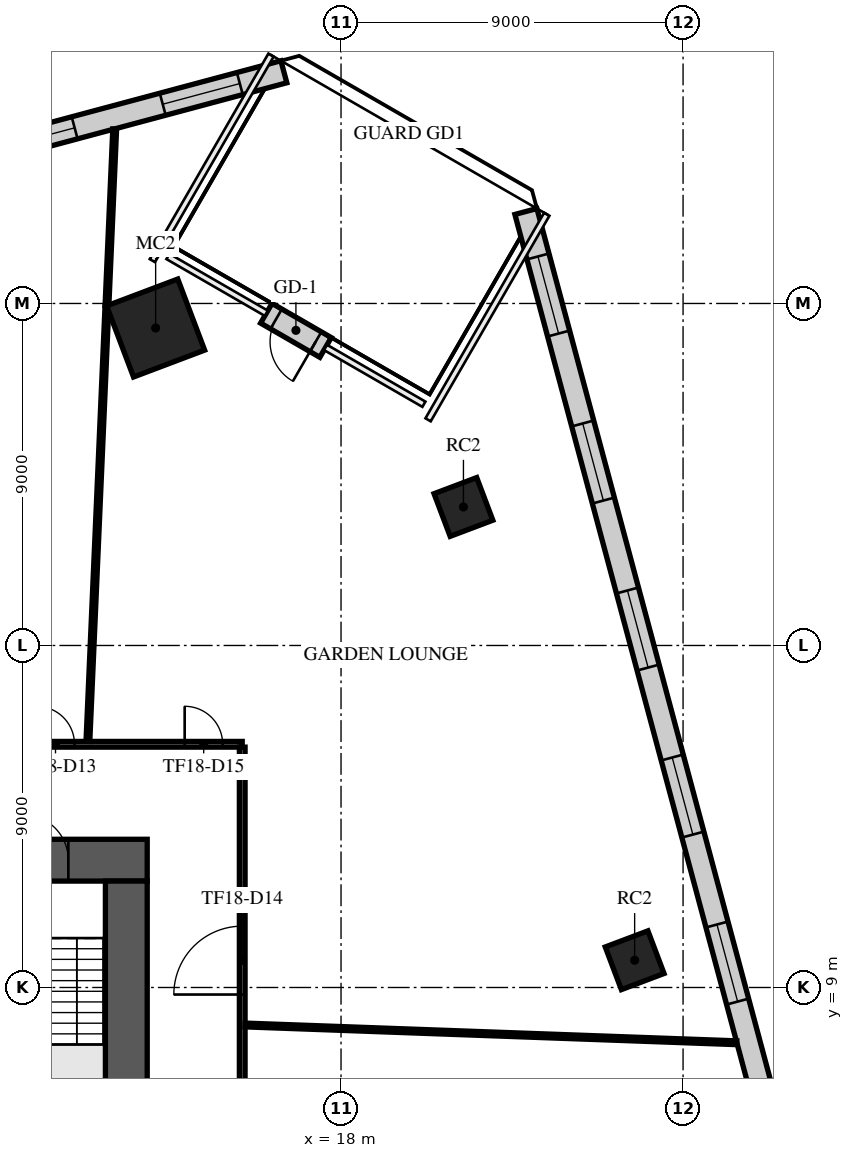
"""IFC4 building model, lengths in metres.
Left out: names, types, materials, properties, quantities, classifications, styles, units other than length and angle.
Written with IfcOpenShell. Run it as: python <this file> out.ifc"""

import sys

from ifc_helpers import new_model, si_unit, direction, frame, frame_2d, origin, origin_2d, place, context, subcontext, project, spatial, rectangle, extrude, element, fill, save


model = new_model("IFC4")
c1 = context("Model", 3, precision=1e-05, world=origin(), true_north=direction((0.0, 1.0)))
c2 = subcontext(c1, "Body", "Model", "MODEL_VIEW")
j1 = project(units=[si_unit("LENGTHUNIT", "METRE"), si_unit("PLANEANGLEUNIT", "RADIAN")], contexts=[c1])
p1 = place(None, origin())
s1 = spatial("IfcSite", under=j1, at=p1, CompositionType="ELEMENT")
p2 = place(p1, origin())
s2 = spatial("IfcBuilding", under=s1, at=p2, CompositionType="ELEMENT")
p3 = place(p2, frame((0.0, 0.0, 82.1)))
s3 = spatial("IfcBuildingStorey", under=s2, at=p3, CompositionType="ELEMENT", Elevation=82.1)
p4 = place(p3, frame((13.122, 26.354, -0.42), z_axis=(0.0, 0.0, 1.0), x_axis=(0.935491525991, 0.353349125935, 0.0)))
e1 = element("IfcColumn", 1, at=p4, inside=s3, PredefinedType="COLUMN", context=c2, shape_type="SweptSolid", body=[
    extrude(rectangle(XDim=2.0, YDim=2.0, at=origin_2d()), origin(), (0.0, 0.0, 1.0), 4.42),
])
for number, where, z_axis, x_axis in (
    (2, (25.726, 9.717, -0.42), (0.0, 0.0, 1.0), (0.935, 0.353, 0.0)),
    (3, (21.221, 21.645, -0.42), (0.0, 0.0, 1.0), (0.935, 0.353, 0.0)),
):
    element("IfcColumn", number, at=place(p3, frame(where, z_axis=z_axis, x_axis=x_axis)), inside=s3, PredefinedType="COLUMN", context=c2, shape_type="SweptSolid", body=[
        extrude(rectangle(XDim=1.2, YDim=1.2, at=origin_2d()), origin(), (0.0, 0.0, 1.0), 4.42),
    ])
p5 = place(p3, frame((-12.9, 12.35, 0.0), z_axis=(0.0, 0.0, 1.0), x_axis=(1.0, 0.0, 0.0)))
e4 = element("IfcWall", 4, at=p5, inside=s3, PredefinedType="SHEAR", context=c2, shape_type="SweptSolid", body=[
    extrude(rectangle(XDim=25.8, YDim=1.1, at=frame_2d((12.9, 0.0))), origin(), (0.0, 0.0, 1.0), 3.58),
])
p6 = place(p5, frame((11.7, 0.0, 0.0)))
e5 = element("IfcOpeningElement", 5, at=p6, cuts=e4, PredefinedType="OPENING", context=c2, shape_type="SweptSolid", body=[
    extrude(rectangle(XDim=2.4, YDim=2.4, at=frame_2d((1.2, 1.2))), frame((0.0, 0.56, 0.0), z_axis=(0.0, -1.0, 0.0), x_axis=(1.0, 0.0, 0.0)), (0.0, 0.0, 1.0), 1.12),
])
p7 = place(p5, frame((22.525, 0.0, 0.0)))
e6 = element("IfcOpeningElement", 6, at=p7, cuts=e4, PredefinedType="OPENING", context=c2, shape_type="SweptSolid", body=[
    extrude(rectangle(XDim=1.2, YDim=2.1, at=frame_2d((0.6, 1.05))), frame((0.0, 0.56, 0.0), z_axis=(0.0, -1.0, 0.0), x_axis=(1.0, 0.0, 0.0)), (0.0, 0.0, 1.0), 1.12),
])
p8 = place(p5, frame((1.5, 0.0, 0.0)))
e7 = element("IfcOpeningElement", 7, at=p8, cuts=e4, PredefinedType="OPENING", context=c2, shape_type="SweptSolid", body=[
    extrude(rectangle(XDim=1.0, YDim=2.1, at=frame_2d((0.5, 1.05))), frame((0.0, 0.56, 0.0), z_axis=(0.0, -1.0, 0.0), x_axis=(1.0, 0.0, 0.0)), (0.0, 0.0, 1.0), 1.12),
])
p9 = place(p3, frame((12.35, -11.8, 0.0), z_axis=(0.0, 0.0, 1.0), x_axis=(0.0, 1.0, 0.0)))
e8 = element("IfcWall", 8, at=p9, inside=s3, PredefinedType="SHEAR", context=c2, shape_type="SweptSolid", body=[
    extrude(rectangle(XDim=23.6, YDim=1.1, at=frame_2d((11.8, 0.0))), origin(), (0.0, 0.0, 1.0), 3.58),
])
p10 = place(p9, frame((10.6, 0.0, 0.0)))
e9 = element("IfcOpeningElement", 9, at=p10, cuts=e8, PredefinedType="OPENING", context=c2, shape_type="SweptSolid", body=[
    extrude(rectangle(XDim=2.4, YDim=2.4, at=frame_2d((1.2, 1.2))), frame((0.0, 0.56, 0.0), z_axis=(0.0, -1.0, 0.0), x_axis=(1.0, 0.0, 0.0)), (0.0, 0.0, 1.0), 1.12),
])
p11 = place(p3, frame((16.496, 33.097, 0.0), z_axis=(0.0, 0.0, 1.0), x_axis=(-0.965926333894, -0.258817150689, 0.0)))
e10 = element("IfcWall", 10, at=p11, inside=s3, PredefinedType="STANDARD", context=c2, shape_type="SweptSolid", body=[
    extrude(rectangle(XDim=49.376, YDim=0.6, at=frame_2d((24.688, 0.0))), origin(), (0.0, 0.0, 1.0), 3.58),
])
p12 = place(p11, frame((1.2, 0.0, 0.9)))
e11 = element("IfcOpeningElement", 11, at=p12, cuts=e10, PredefinedType="OPENING", context=c2, shape_type="SweptSolid", body=[
    extrude(rectangle(XDim=2.1, YDim=2.1, at=frame_2d((1.05, 1.05))), frame((0.0, 0.31, 0.0), z_axis=(0.0, -1.0, 0.0), x_axis=(1.0, 0.0, 0.0)), (0.0, 0.0, 1.0), 0.62),
])
p13 = place(p11, frame((5.7, 0.0, 0.9)))
e12 = element("IfcOpeningElement", 12, at=p13, cuts=e10, PredefinedType="OPENING", context=c2, shape_type="SweptSolid", body=[
    extrude(rectangle(XDim=2.1, YDim=2.1, at=frame_2d((1.05, 1.05))), frame((0.0, 0.31, 0.0), z_axis=(0.0, -1.0, 0.0), x_axis=(1.0, 0.0, 0.0)), (0.0, 0.0, 1.0), 0.62),
])
p14 = place(p11, frame((10.2, 0.0, 0.9)))
e13 = element("IfcOpeningElement", 13, at=p14, cuts=e10, PredefinedType="OPENING", context=c2, shape_type="SweptSolid", body=[
    extrude(rectangle(XDim=2.1, YDim=2.1, at=frame_2d((1.05, 1.05))), frame((0.0, 0.31, 0.0), z_axis=(0.0, -1.0, 0.0), x_axis=(1.0, 0.0, 0.0)), (0.0, 0.0, 1.0), 0.62),
])
p15 = place(p11, frame((14.7, 0.0, 0.9)))
e14 = element("IfcOpeningElement", 14, at=p15, cuts=e10, PredefinedType="OPENING", context=c2, shape_type="SweptSolid", body=[
    extrude(rectangle(XDim=2.1, YDim=2.1, at=frame_2d((1.05, 1.05))), frame((0.0, 0.31, 0.0), z_axis=(0.0, -1.0, 0.0), x_axis=(1.0, 0.0, 0.0)), (0.0, 0.0, 1.0), 0.62),
])
p16 = place(p11, frame((19.2, 0.0, 0.9)))
e15 = element("IfcOpeningElement", 15, at=p16, cuts=e10, PredefinedType="OPENING", context=c2, shape_type="SweptSolid", body=[
    extrude(rectangle(XDim=2.1, YDim=2.1, at=frame_2d((1.05, 1.05))), frame((0.0, 0.31, 0.0), z_axis=(0.0, -1.0, 0.0), x_axis=(1.0, 0.0, 0.0)), (0.0, 0.0, 1.0), 0.62),
])
p17 = place(p11, frame((23.7, 0.0, 0.9)))
e16 = element("IfcOpeningElement", 16, at=p17, cuts=e10, PredefinedType="OPENING", context=c2, shape_type="SweptSolid", body=[
    extrude(rectangle(XDim=2.1, YDim=2.1, at=frame_2d((1.05, 1.05))), frame((0.0, 0.31, 0.0), z_axis=(0.0, -1.0, 0.0), x_axis=(1.0, 0.0, 0.0)), (0.0, 0.0, 1.0), 0.62),
])
p18 = place(p11, frame((28.2, 0.0, 0.9)))
e17 = element("IfcOpeningElement", 17, at=p18, cuts=e10, PredefinedType="OPENING", context=c2, shape_type="SweptSolid", body=[
    extrude(rectangle(XDim=2.1, YDim=2.1, at=frame_2d((1.05, 1.05))), frame((0.0, 0.31, 0.0), z_axis=(0.0, -1.0, 0.0), x_axis=(1.0, 0.0, 0.0)), (0.0, 0.0, 1.0), 0.62),
])
p19 = place(p11, frame((32.7, 0.0, 0.9)))
e18 = element("IfcOpeningElement", 18, at=p19, cuts=e10, PredefinedType="OPENING", context=c2, shape_type="SweptSolid", body=[
    extrude(rectangle(XDim=2.1, YDim=2.1, at=frame_2d((1.05, 1.05))), frame((0.0, 0.31, 0.0), z_axis=(0.0, -1.0, 0.0), x_axis=(1.0, 0.0, 0.0)), (0.0, 0.0, 1.0), 0.62),
])
p20 = place(p11, frame((37.2, 0.0, 0.9)))
e19 = element("IfcOpeningElement", 19, at=p20, cuts=e10, PredefinedType="OPENING", context=c2, shape_type="SweptSolid", body=[
    extrude(rectangle(XDim=2.1, YDim=2.1, at=frame_2d((1.05, 1.05))), frame((0.0, 0.31, 0.0), z_axis=(0.0, -1.0, 0.0), x_axis=(1.0, 0.0, 0.0)), (0.0, 0.0, 1.0), 0.62),
])
p21 = place(p11, frame((41.7, 0.0, 0.9)))
e20 = element("IfcOpeningElement", 20, at=p21, cuts=e10, PredefinedType="OPENING", context=c2, shape_type="SweptSolid", body=[
    extrude(rectangle(XDim=2.1, YDim=2.1, at=frame_2d((1.05, 1.05))), frame((0.0, 0.31, 0.0), z_axis=(0.0, -1.0, 0.0), x_axis=(1.0, 0.0, 0.0)), (0.0, 0.0, 1.0), 0.62),
])
p22 = place(p11, frame((46.138, 0.0, 0.9)))
e21 = element("IfcOpeningElement", 21, at=p22, cuts=e10, PredefinedType="OPENING", context=c2, shape_type="SweptSolid", body=[
    extrude(rectangle(XDim=2.1, YDim=2.1, at=frame_2d((1.05, 1.05))), frame((0.0, 0.31, 0.0), z_axis=(0.0, -1.0, 0.0), x_axis=(1.0, 0.0, 0.0)), (0.0, 0.0, 1.0), 0.62),
])
p23 = place(p3, frame((34.609, -14.409, 0.0), z_axis=(0.0, 0.0, 1.0), x_axis=(-0.258819814566, 0.965925620112, 0.0)))
e22 = element("IfcWall", 22, at=p23, inside=s3, PredefinedType="STANDARD", context=c2, shape_type="SweptSolid", body=[
    extrude(rectangle(XDim=45.376, YDim=0.6, at=frame_2d((22.688, 0.0))), origin(), (0.0, 0.0, 1.0), 3.58),
])
p24 = place(p23, frame((1.163, 0.0, 0.9)))
e23 = element("IfcOpeningElement", 23, at=p24, cuts=e22, PredefinedType="OPENING", context=c2, shape_type="SweptSolid", body=[
    extrude(rectangle(XDim=2.1, YDim=2.1, at=frame_2d((1.05, 1.05))), frame((0.0, 0.31, 0.0), z_axis=(0.0, -1.0, 0.0), x_axis=(1.0, 0.0, 0.0)), (0.0, 0.0, 1.0), 0.62),
])
p25 = place(p23, frame((5.651, 0.0, 0.9)))
e24 = element("IfcOpeningElement", 24, at=p25, cuts=e22, PredefinedType="OPENING", context=c2, shape_type="SweptSolid", body=[
    extrude(rectangle(XDim=2.1, YDim=2.1, at=frame_2d((1.05, 1.05))), frame((0.0, 0.31, 0.0), z_axis=(0.0, -1.0, 0.0), x_axis=(1.0, 0.0, 0.0)), (0.0, 0.0, 1.0), 0.62),
])
p26 = place(p23, frame((10.201, 0.0, 0.9)))
e25 = element("IfcOpeningElement", 25, at=p26, cuts=e22, PredefinedType="OPENING", context=c2, shape_type="SweptSolid", body=[
    extrude(rectangle(XDim=2.1, YDim=2.1, at=frame_2d((1.05, 1.05))), frame((0.0, 0.31, 0.0), z_axis=(0.0, -1.0, 0.0), x_axis=(1.0, 0.0, 0.0)), (0.0, 0.0, 1.0), 0.62),
])
p27 = place(p23, frame((14.751, 0.0, 0.9)))
e26 = element("IfcOpeningElement", 26, at=p27, cuts=e22, PredefinedType="OPENING", context=c2, shape_type="SweptSolid", body=[
    extrude(rectangle(XDim=2.1, YDim=2.1, at=frame_2d((1.05, 1.05))), frame((0.0, 0.31, 0.0), z_axis=(0.0, -1.0, 0.0), x_axis=(1.0, 0.0, 0.0)), (0.0, 0.0, 1.0), 0.62),
])
p28 = place(p23, frame((19.301, 0.0, 0.9)))
e27 = element("IfcOpeningElement", 27, at=p28, cuts=e22, PredefinedType="OPENING", context=c2, shape_type="SweptSolid", body=[
    extrude(rectangle(XDim=2.1, YDim=2.1, at=frame_2d((1.05, 1.05))), frame((0.0, 0.31, 0.0), z_axis=(0.0, -1.0, 0.0), x_axis=(1.0, 0.0, 0.0)), (0.0, 0.0, 1.0), 0.62),
])
p29 = place(p23, frame((23.851, 0.0, 0.9)))
e28 = element("IfcOpeningElement", 28, at=p29, cuts=e22, PredefinedType="OPENING", context=c2, shape_type="SweptSolid", body=[
    extrude(rectangle(XDim=2.1, YDim=2.1, at=frame_2d((1.05, 1.05))), frame((0.0, 0.31, 0.0), z_axis=(0.0, -1.0, 0.0), x_axis=(1.0, 0.0, 0.0)), (0.0, 0.0, 1.0), 0.62),
])
p30 = place(p23, frame((28.401, 0.0, 0.9)))
e29 = element("IfcOpeningElement", 29, at=p30, cuts=e22, PredefinedType="OPENING", context=c2, shape_type="SweptSolid", body=[
    extrude(rectangle(XDim=2.1, YDim=2.1, at=frame_2d((1.05, 1.05))), frame((0.0, 0.31, 0.0), z_axis=(0.0, -1.0, 0.0), x_axis=(1.0, 0.0, 0.0)), (0.0, 0.0, 1.0), 0.62),
])
p31 = place(p23, frame((32.951, 0.0, 0.9)))
e30 = element("IfcOpeningElement", 30, at=p31, cuts=e22, PredefinedType="OPENING", context=c2, shape_type="SweptSolid", body=[
    extrude(rectangle(XDim=2.1, YDim=2.1, at=frame_2d((1.05, 1.05))), frame((0.0, 0.31, 0.0), z_axis=(0.0, -1.0, 0.0), x_axis=(1.0, 0.0, 0.0)), (0.0, 0.0, 1.0), 0.62),
])
p32 = place(p23, frame((37.501, 0.0, 0.9)))
e31 = element("IfcOpeningElement", 31, at=p32, cuts=e22, PredefinedType="OPENING", context=c2, shape_type="SweptSolid", body=[
    extrude(rectangle(XDim=2.1, YDim=2.1, at=frame_2d((1.05, 1.05))), frame((0.0, 0.31, 0.0), z_axis=(0.0, -1.0, 0.0), x_axis=(1.0, 0.0, 0.0)), (0.0, 0.0, 1.0), 0.62),
])
p33 = place(p23, frame((42.051, 0.0, 0.9)))
e32 = element("IfcOpeningElement", 32, at=p33, cuts=e22, PredefinedType="OPENING", context=c2, shape_type="SweptSolid", body=[
    extrude(rectangle(XDim=2.1, YDim=2.1, at=frame_2d((1.05, 1.05))), frame((0.0, 0.31, 0.0), z_axis=(0.0, -1.0, 0.0), x_axis=(1.0, 0.0, 0.0)), (0.0, 0.0, 1.0), 0.62),
])
p34 = place(p3, frame((17.593, 25.843, 0.0), z_axis=(0.0, 0.0, 1.0), x_axis=(-0.866047807691, 0.499961193289, 0.0)))
e33 = element("IfcWall", 33, at=p34, inside=s3, PredefinedType="STANDARD", context=c2, shape_type="SweptSolid", body=[
    extrude(rectangle(XDim=1.8, YDim=0.6, at=frame_2d((0.9, 0.0))), origin(), (0.0, 0.0, 1.0), 3.58),
])
p35 = place(p34, frame((0.3, 0.0, 0.0)))
e34 = element("IfcOpeningElement", 34, at=p35, cuts=e33, PredefinedType="OPENING", context=c2, shape_type="SweptSolid", body=[
    extrude(rectangle(XDim=1.2, YDim=2.4, at=frame_2d((0.6, 1.2))), frame((0.0, 0.31, 0.0), z_axis=(0.0, -1.0, 0.0), x_axis=(1.0, 0.0, 0.0)), (0.0, 0.0, 1.0), 0.62),
])
p36 = place(p3, frame((-15.325, 15.4, 0.0), z_axis=(0.0, 0.0, 1.0), x_axis=(1.0, 0.0, 0.0)))
e35 = element("IfcWall", 35, at=p36, inside=s3, PredefinedType="PARTITIONING", context=c2, shape_type="SweptSolid", body=[
    extrude(rectangle(XDim=30.725, YDim=0.15, at=frame_2d((15.362, 0.0))), origin(), (0.0, 0.0, 1.0), 3.08),
])
p37 = place(p36, frame((2.05, 0.0, 0.0)))
e36 = element("IfcOpeningElement", 36, at=p37, cuts=e35, PredefinedType="OPENING", context=c2, shape_type="SweptSolid", body=[
    extrude(rectangle(XDim=1.8, YDim=2.1, at=frame_2d((0.9, 1.05))), frame((0.0, 0.085, 0.0), z_axis=(0.0, -1.0, 0.0), x_axis=(1.0, 0.0, 0.0)), (0.0, 0.0, 1.0), 0.17),
])
p38 = place(p36, frame((13.188, 0.0, 0.0)))
e37 = element("IfcOpeningElement", 37, at=p38, cuts=e35, PredefinedType="OPENING", context=c2, shape_type="SweptSolid", body=[
    extrude(rectangle(XDim=1.0, YDim=2.1, at=frame_2d((0.5, 1.05))), frame((0.0, 0.085, 0.0), z_axis=(0.0, -1.0, 0.0), x_axis=(1.0, 0.0, 0.0)), (0.0, 0.0, 1.0), 0.17),
])
p39 = place(p36, frame((15.892, 0.0, 0.0)))
e38 = element("IfcOpeningElement", 38, at=p39, cuts=e35, PredefinedType="OPENING", context=c2, shape_type="SweptSolid", body=[
    extrude(rectangle(XDim=1.0, YDim=2.1, at=frame_2d((0.5, 1.05))), frame((0.0, 0.085, 0.0), z_axis=(0.0, -1.0, 0.0), x_axis=(1.0, 0.0, 0.0)), (0.0, 0.0, 1.0), 0.17),
])
p40 = place(p36, frame((25.312, 0.0, 0.0)))
e39 = element("IfcOpeningElement", 39, at=p40, cuts=e35, PredefinedType="OPENING", context=c2, shape_type="SweptSolid", body=[
    extrude(rectangle(XDim=1.0, YDim=2.1, at=frame_2d((0.5, 1.05))), frame((0.0, 0.085, 0.0), z_axis=(0.0, -1.0, 0.0), x_axis=(1.0, 0.0, 0.0)), (0.0, 0.0, 1.0), 0.17),
])
p41 = place(p36, frame((29.211, 0.0, 0.0)))
e40 = element("IfcOpeningElement", 40, at=p41, cuts=e35, PredefinedType="OPENING", context=c2, shape_type="SweptSolid", body=[
    extrude(rectangle(XDim=1.0, YDim=2.1, at=frame_2d((0.5, 1.05))), frame((0.0, 0.085, 0.0), z_axis=(0.0, -1.0, 0.0), x_axis=(1.0, 0.0, 0.0)), (0.0, 0.0, 1.0), 0.17),
])
p42 = place(p3, frame((15.4, -15.325, 0.0), z_axis=(0.0, 0.0, 1.0), x_axis=(0.0, 1.0, 0.0)))
e41 = element("IfcWall", 41, at=p42, inside=s3, PredefinedType="PARTITIONING", context=c2, shape_type="SweptSolid", body=[
    extrude(rectangle(XDim=30.65, YDim=0.15, at=frame_2d((15.325, 0.0))), origin(), (0.0, 0.0, 1.0), 3.08),
])
p43 = place(p42, frame((24.14, 0.0, 0.0)))
e42 = element("IfcOpeningElement", 42, at=p43, cuts=e41, PredefinedType="OPENING", context=c2, shape_type="SweptSolid", body=[
    extrude(rectangle(XDim=1.8, YDim=2.1, at=frame_2d((0.9, 1.05))), frame((0.0, 0.085, 0.0), z_axis=(0.0, -1.0, 0.0), x_axis=(1.0, 0.0, 0.0)), (0.0, 0.0, 1.0), 0.17),
])
p44 = place(p42, frame((3.3, 0.0, 0.0)))
e43 = element("IfcOpeningElement", 43, at=p44, cuts=e41, PredefinedType="OPENING", context=c2, shape_type="SweptSolid", body=[
    extrude(rectangle(XDim=1.8, YDim=2.1, at=frame_2d((0.9, 1.05))), frame((0.0, 0.085, 0.0), z_axis=(0.0, -1.0, 0.0), x_axis=(1.0, 0.0, 0.0)), (0.0, 0.0, 1.0), 0.17),
])
p45 = place(p42, frame((19.191, 0.0, 0.0)))
e44 = element("IfcOpeningElement", 44, at=p45, cuts=e41, PredefinedType="OPENING", context=c2, shape_type="SweptSolid", body=[
    extrude(rectangle(XDim=1.0, YDim=2.1, at=frame_2d((0.5, 1.05))), frame((0.0, 0.085, 0.0), z_axis=(0.0, -1.0, 0.0), x_axis=(1.0, 0.0, 0.0)), (0.0, 0.0, 1.0), 0.17),
])
p46 = place(p42, frame((10.963, 0.0, 0.0)))
e45 = element("IfcOpeningElement", 45, at=p46, cuts=e41, PredefinedType="OPENING", context=c2, shape_type="SweptSolid", body=[
    extrude(rectangle(XDim=1.0, YDim=2.1, at=frame_2d((0.5, 1.05))), frame((0.0, 0.085, 0.0), z_axis=(0.0, -1.0, 0.0), x_axis=(1.0, 0.0, 0.0)), (0.0, 0.0, 1.0), 0.17),
])
p47 = place(p3, frame((11.339, 15.477, 0.0), z_axis=(0.0, 0.0, 1.0), x_axis=(0.04370366829, 0.999044538235, 0.0)))
e46 = element("IfcWall", 46, at=p47, inside=s3, PredefinedType="PARTITIONING", context=c2, shape_type="SweptSolid", body=[
    extrude(rectangle(XDim=11.452, YDim=0.1, at=frame_2d((5.726, 0.0))), origin(), (0.0, 0.0, 1.0), 3.58),
])
p48 = place(p3, frame((11.841, 26.939, 0.0), z_axis=(0.0, 0.0, 1.0), x_axis=(0.04372159787, 0.999043753736, 0.0)))
e47 = element("IfcWall", 47, at=p48, inside=s3, PredefinedType="PARTITIONING", context=c2, shape_type="SweptSolid", body=[
    extrude(rectangle(XDim=4.657, YDim=0.1, at=frame_2d((2.329, 0.0))), origin(), (0.0, 0.0, 1.0), 3.58),
])
p49 = place(p3, frame((15.477, 8.013, 0.0), z_axis=(0.0, 0.0, 1.0), x_axis=(0.999348235862, -0.036098524609, 0.0)))
e48 = element("IfcWall", 48, at=p49, inside=s3, PredefinedType="PARTITIONING", context=c2, shape_type="SweptSolid", body=[
    extrude(rectangle(XDim=12.945, YDim=0.1, at=frame_2d((6.472, 0.0))), origin(), (0.0, 0.0, 1.0), 3.58),
])
p50 = place(p7, origin())
e49 = element("IfcDoor", 49, at=p50, inside=s3, OperationType="SINGLE_SWING_LEFT", PredefinedType="DOOR", context=c2, shape_type="SweptSolid", body=[
    extrude(rectangle(XDim=1.2, YDim=2.1, at=frame_2d((0.6, 1.05))), frame((0.0, 0.025, 0.0), z_axis=(0.0, -1.0, 0.0), x_axis=(1.0, 0.0, 0.0)), (0.0, 0.0, 1.0), 0.05),
])
fill(e6, e49)
p51 = place(p12, origin())
e50 = element("IfcWindow", 50, at=p51, inside=s3, PartitioningType="SINGLE_PANEL", PredefinedType="WINDOW", context=c2, shape_type="SweptSolid", body=[
    extrude(rectangle(XDim=2.1, YDim=2.1, at=frame_2d((1.05, 1.05))), frame((0.0, 0.03, 0.0), z_axis=(0.0, -1.0, 0.0), x_axis=(1.0, 0.0, 0.0)), (0.0, 0.0, 1.0), 0.06),
])
fill(e11, e50)
p52 = place(p13, origin())
e51 = element("IfcWindow", 51, at=p52, inside=s3, PartitioningType="SINGLE_PANEL", PredefinedType="WINDOW", context=c2, shape_type="SweptSolid", body=[
    extrude(rectangle(XDim=2.1, YDim=2.1, at=frame_2d((1.05, 1.05))), frame((0.0, 0.03, 0.0), z_axis=(0.0, -1.0, 0.0), x_axis=(1.0, 0.0, 0.0)), (0.0, 0.0, 1.0), 0.06),
])
fill(e12, e51)
p53 = place(p29, origin())
e52 = element("IfcWindow", 52, at=p53, inside=s3, PartitioningType="SINGLE_PANEL", PredefinedType="WINDOW", context=c2, shape_type="SweptSolid", body=[
    extrude(rectangle(XDim=2.1, YDim=2.1, at=frame_2d((1.05, 1.05))), frame((0.0, 0.03, 0.0), z_axis=(0.0, -1.0, 0.0), x_axis=(1.0, 0.0, 0.0)), (0.0, 0.0, 1.0), 0.06),
])
fill(e28, e52)
p54 = place(p30, origin())
e53 = element("IfcWindow", 53, at=p54, inside=s3, PartitioningType="SINGLE_PANEL", PredefinedType="WINDOW", context=c2, shape_type="SweptSolid", body=[
    extrude(rectangle(XDim=2.1, YDim=2.1, at=frame_2d((1.05, 1.05))), frame((0.0, 0.03, 0.0), z_axis=(0.0, -1.0, 0.0), x_axis=(1.0, 0.0, 0.0)), (0.0, 0.0, 1.0), 0.06),
])
fill(e29, e53)
p55 = place(p31, origin())
e54 = element("IfcWindow", 54, at=p55, inside=s3, PartitioningType="SINGLE_PANEL", PredefinedType="WINDOW", context=c2, shape_type="SweptSolid", body=[
    extrude(rectangle(XDim=2.1, YDim=2.1, at=frame_2d((1.05, 1.05))), frame((0.0, 0.03, 0.0), z_axis=(0.0, -1.0, 0.0), x_axis=(1.0, 0.0, 0.0)), (0.0, 0.0, 1.0), 0.06),
])
fill(e30, e54)
p56 = place(p32, origin())
e55 = element("IfcWindow", 55, at=p56, inside=s3, PartitioningType="SINGLE_PANEL", PredefinedType="WINDOW", context=c2, shape_type="SweptSolid", body=[
    extrude(rectangle(XDim=2.1, YDim=2.1, at=frame_2d((1.05, 1.05))), frame((0.0, 0.03, 0.0), z_axis=(0.0, -1.0, 0.0), x_axis=(1.0, 0.0, 0.0)), (0.0, 0.0, 1.0), 0.06),
])
fill(e31, e55)
p57 = place(p33, origin())
e56 = element("IfcWindow", 56, at=p57, inside=s3, PartitioningType="SINGLE_PANEL", PredefinedType="WINDOW", context=c2, shape_type="SweptSolid", body=[
    extrude(rectangle(XDim=2.1, YDim=2.1, at=frame_2d((1.05, 1.05))), frame((0.0, 0.03, 0.0), z_axis=(0.0, -1.0, 0.0), x_axis=(1.0, 0.0, 0.0)), (0.0, 0.0, 1.0), 0.06),
])
fill(e32, e56)
p58 = place(p35, origin())
e57 = element("IfcDoor", 57, at=p58, inside=s3, OperationType="SINGLE_SWING_LEFT", PredefinedType="DOOR", context=c2, shape_type="SweptSolid", body=[
    extrude(rectangle(XDim=1.2, YDim=2.4, at=frame_2d((0.6, 1.2))), frame((0.0, 0.025, 0.0), z_axis=(0.0, -1.0, 0.0), x_axis=(1.0, 0.0, 0.0)), (0.0, 0.0, 1.0), 0.05),
])
fill(e34, e57)
p59 = place(p40, origin())
e58 = element("IfcDoor", 58, at=p59, inside=s3, OperationType="SINGLE_SWING_RIGHT", PredefinedType="DOOR", context=c2, shape_type="SweptSolid", body=[
    extrude(rectangle(XDim=1.0, YDim=2.1, at=frame_2d((0.5, 1.05))), frame((0.0, 0.025, 0.0), z_axis=(0.0, -1.0, 0.0), x_axis=(1.0, 0.0, 0.0)), (0.0, 0.0, 1.0), 0.05),
])
fill(e39, e58)
p60 = place(p43, frame((1.8, 0.0, 0.0), z_axis=(0.0, 0.0, 1.0), x_axis=(-1.0, 0.0, 0.0)))
e59 = element("IfcDoor", 59, at=p60, inside=s3, OperationType="DOUBLE_DOOR_SINGLE_SWING", PredefinedType="DOOR", context=c2, shape_type="SweptSolid", body=[
    extrude(rectangle(XDim=1.8, YDim=2.1, at=frame_2d((0.9, 1.05))), frame((0.0, 0.025, 0.0), z_axis=(0.0, -1.0, 0.0), x_axis=(1.0, 0.0, 0.0)), (0.0, 0.0, 1.0), 0.05),
])
fill(e42, e59)
p61 = place(p41, origin())
e60 = element("IfcDoor", 60, at=p61, inside=s3, OperationType="SINGLE_SWING_LEFT", PredefinedType="DOOR", context=c2, shape_type="SweptSolid", body=[
    extrude(rectangle(XDim=1.0, YDim=2.1, at=frame_2d((0.5, 1.05))), frame((0.0, 0.025, 0.0), z_axis=(0.0, -1.0, 0.0), x_axis=(1.0, 0.0, 0.0)), (0.0, 0.0, 1.0), 0.05),
])
fill(e40, e60)
save(model, sys.argv[1])
